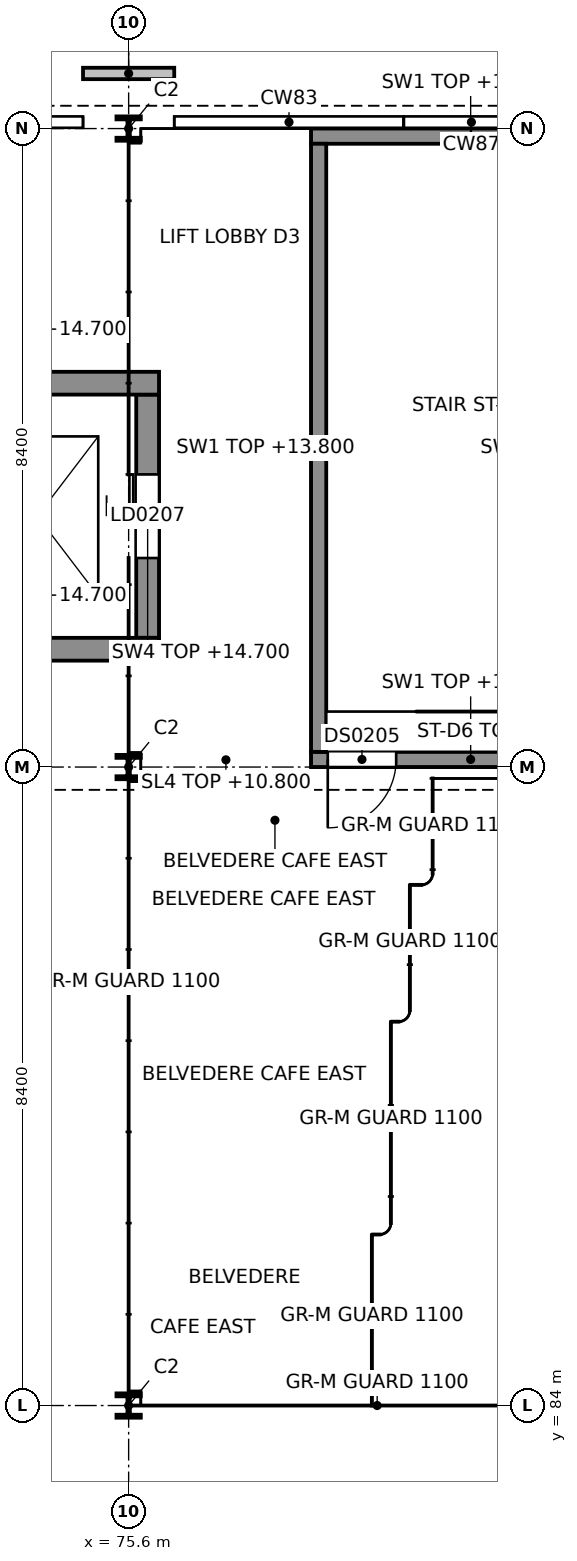
"""IFC4 building model, lengths in metres.
Left out: names, types, materials, properties, quantities, classifications, styles, units other than length and angle.
Written with IfcOpenShell. Run it as: python <this file> out.ifc"""

import sys

from ifc_helpers import new_model, si_unit, direction, frame, frame_2d, origin, origin_2d, place, context, subcontext, project, spatial, rectangle, i_section, extrude, element, fill, save


model = new_model("IFC4")
c1 = context("Model", 3, precision=1e-05, world=origin(), true_north=direction((0.0, 1.0)))
c2 = subcontext(c1, "Body", "Model", "MODEL_VIEW")
j1 = project(units=[si_unit("LENGTHUNIT", "METRE"), si_unit("PLANEANGLEUNIT", "RADIAN")], contexts=[c1])
p1 = place(None, origin())
s1 = spatial("IfcSite", under=j1, at=p1, CompositionType="ELEMENT")
p2 = place(p1, origin())
s2 = spatial("IfcBuilding", under=s1, at=p2, CompositionType="ELEMENT")
p3 = place(p2, frame((0.0, 0.0, 10.8)))
s3 = spatial("IfcBuildingStorey", under=s2, at=p3, CompositionType="ELEMENT", Elevation=10.8)
for number, where, z_axis, x_axis in (
    (1, (75.6, 84.0, 0.0), (0.0, 0.0, 1.0), (1.0, 0.0, 0.0)),
    (2, (75.6, 92.4, 0.0), (0.0, 0.0, 1.0), (1.0, 0.0, 0.0)),
    (3, (75.6, 100.8, 0.0), (0.0, 0.0, 1.0), (1.0, 0.0, 0.0)),
):
    element("IfcColumn", number, at=place(p3, frame(where, z_axis=z_axis, x_axis=x_axis)), inside=s3, PredefinedType="COLUMN", context=c2, shape_type="SweptSolid", body=[
        extrude(i_section(OverallWidth=0.3, OverallDepth=0.3, WebThickness=0.011, FlangeThickness=0.019, at=origin_2d()), origin(), (0.0, 0.0, 1.0), 4.2),
    ])
p4 = place(p3, frame((78.0, 92.5, 0.0), z_axis=(0.0, 0.0, 1.0), x_axis=(1.0, 0.0, 0.0)))
e4 = element("IfcWall", 4, at=p4, inside=s3, PredefinedType="SHEAR", context=c2, shape_type="SweptSolid", body=[
    extrude(rectangle(XDim=4.2, YDim=0.2, at=frame_2d((2.1, 0.0))), origin(), (0.0, 0.0, 1.0), 3.0),
])
p5 = place(p4, frame((0.22, 0.0, 0.0)))
e5 = element("IfcOpeningElement", 5, at=p5, cuts=e4, PredefinedType="OPENING", context=c2, shape_type="SweptSolid", body=[
    extrude(rectangle(XDim=0.9, YDim=2.0, at=frame_2d((0.45, 1.0))), frame((0.0, 0.1, 0.0), z_axis=(0.0, -1.0, 0.0), x_axis=(1.0, 0.0, 0.0)), (0.0, 0.0, 1.0), 0.2),
])
p6 = place(p3, frame((78.0, 100.7, 0.0), z_axis=(0.0, 0.0, 1.0), x_axis=(1.0, 0.0, 0.0)))
e6 = element("IfcWall", 6, at=p6, inside=s3, PredefinedType="SHEAR", context=c2, shape_type="SweptSolid", body=[
    extrude(rectangle(XDim=4.2, YDim=0.2, at=frame_2d((2.1, 0.0))), origin(), (0.0, 0.0, 1.0), 3.0),
])
p7 = place(p3, frame((78.1, 92.6, 0.0), z_axis=(0.0, 0.0, 1.0), x_axis=(0.0, 1.0, 0.0)))
e7 = element("IfcWall", 7, at=p7, inside=s3, PredefinedType="SHEAR", context=c2, shape_type="SweptSolid", body=[
    extrude(rectangle(XDim=8.0, YDim=0.2, at=frame_2d((4.0, 0.0))), origin(), (0.0, 0.0, 1.0), 3.0),
])
for number, where, z_axis, x_axis in (
    (8, (72.8, 93.95, 0.0), (0.0, 0.0, 1.0), (1.0, 0.0, 0.0)),
    (9, (72.8, 97.45, 0.0), (0.0, 0.0, 1.0), (1.0, 0.0, 0.0)),
):
    element("IfcWall", number, at=place(p3, frame(where, z_axis=z_axis, x_axis=x_axis)), inside=s3, PredefinedType="SHEAR", context=c2, shape_type="SweptSolid", body=[
        extrude(rectangle(XDim=3.2, YDim=0.3, at=frame_2d((1.6, 0.0))), origin(), (0.0, 0.0, 1.0), 3.9),
    ])
p8 = place(p3, frame((75.85, 94.1, 0.0), z_axis=(0.0, 0.0, 1.0), x_axis=(0.0, 1.0, 0.0)))
e10 = element("IfcWall", 10, at=p8, inside=s3, PredefinedType="SHEAR", context=c2, shape_type="SweptSolid", body=[
    extrude(rectangle(XDim=3.2, YDim=0.3, at=frame_2d((1.6, 0.0))), origin(), (0.0, 0.0, 1.0), 3.9),
])
p9 = place(p8, frame((1.05, 0.0, 0.0)))
e11 = element("IfcOpeningElement", 11, at=p9, cuts=e10, PredefinedType="OPENING", context=c2, shape_type="SweptSolid", body=[
    extrude(rectangle(XDim=1.1, YDim=2.1, at=frame_2d((0.55, 1.05))), frame((0.0, 0.15, 0.0), z_axis=(0.0, -1.0, 0.0), x_axis=(1.0, 0.0, 0.0)), (0.0, 0.0, 1.0), 0.3),
])
p10 = place(p3, frame((75.0, 101.525, 0.0), z_axis=(0.0, 0.0, 1.0), x_axis=(1.0, 0.0, 0.0)))
e12 = element("IfcWall", 12, at=p10, inside=s3, PredefinedType="SOLIDWALL", context=c2, shape_type="SweptSolid", body=[
    extrude(rectangle(XDim=1.2, YDim=0.15, at=frame_2d((0.6, 0.0))), origin(), (0.0, 0.0, 1.0), 4.2),
])
p11 = place(p5, origin())
e13 = element("IfcDoor", 13, at=p11, inside=s3, OperationType="SINGLE_SWING_LEFT", PredefinedType="DOOR", context=c2, shape_type="SweptSolid", body=[
    extrude(rectangle(XDim=0.9, YDim=2.0, at=frame_2d((0.45, 1.0))), frame((0.0, 0.025, 0.0), z_axis=(0.0, -1.0, 0.0), x_axis=(1.0, 0.0, 0.0)), (0.0, 0.0, 1.0), 0.05),
])
fill(e5, e13)
p12 = place(p9, origin())
e14 = element("IfcDoor", 14, at=p12, inside=s3, OperationType="SLIDING_TO_LEFT", PredefinedType="DOOR", context=c2, shape_type="SweptSolid", body=[
    extrude(rectangle(XDim=1.1, YDim=2.1, at=frame_2d((0.55, 1.05))), frame((0.0, 0.025, 0.0), z_axis=(0.0, -1.0, 0.0), x_axis=(1.0, 0.0, 0.0)), (0.0, 0.0, 1.0), 0.05),
])
fill(e11, e14)
save(model, sys.argv[1])
